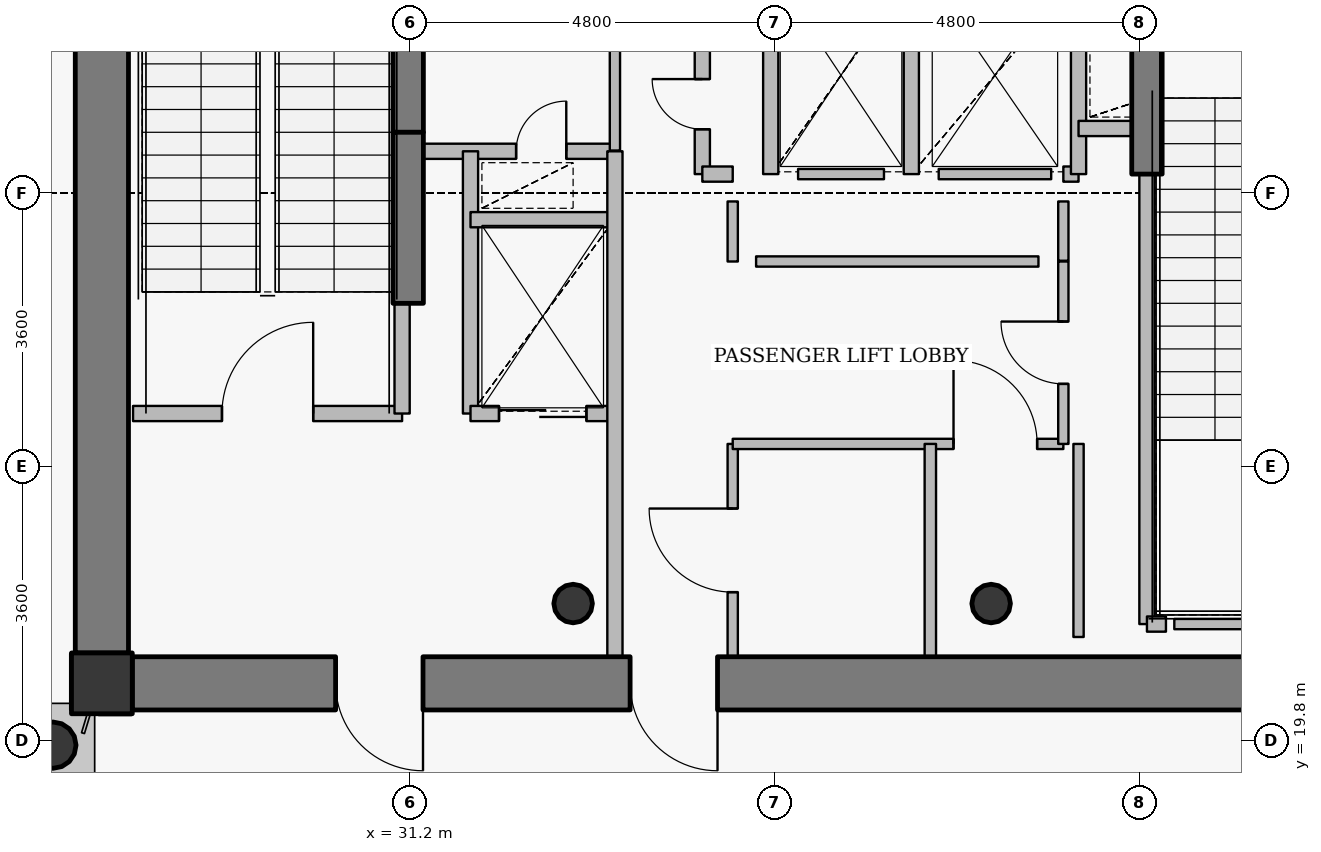
"""IFC4 building model, lengths in metres.
Left out: names, types, materials, properties, quantities, classifications, styles, units other than length and angle.
Written with IfcOpenShell. Run it as: python <this file> out.ifc"""

import sys

from ifc_helpers import new_model, si_unit, direction, frame, frame_2d, origin, origin_2d, place, context, subcontext, project, spatial, rectangle, hollow_circle, extrude, source, transform, mapped, element, fill, save


model = new_model("IFC4")
c1 = context("Model", 3, precision=1e-05, world=origin(), true_north=direction((0.0, 1.0)))
c2 = subcontext(c1, "Body", "Model", "MODEL_VIEW")
j1 = project(units=[si_unit("LENGTHUNIT", "METRE"), si_unit("PLANEANGLEUNIT", "RADIAN")], contexts=[c1])
p1 = place(None, origin())
s1 = spatial("IfcSite", under=j1, at=p1, CompositionType="ELEMENT")
p2 = place(p1, origin())
s2 = spatial("IfcBuilding", under=s1, at=p2, CompositionType="ELEMENT")
p3 = place(p2, frame((0.0, 0.0, 368.4)))
s3 = spatial("IfcBuildingStorey", under=s2, at=p3, CompositionType="ELEMENT", Elevation=368.4)
p4 = place(p3, frame((27.15, 20.55, 0.0), z_axis=(0.0, 0.0, 1.0), x_axis=(1.0, 0.0, 0.0)))
e1 = element("IfcColumn", 1, at=p4, inside=s3, PredefinedType="COLUMN", context=c2, shape_type="SweptSolid", body=[
    extrude(rectangle(XDim=0.8, YDim=0.8, at=origin_2d()), origin(), (0.0, 0.0, 1.0), 4.8),
])
for number, where, z_axis, x_axis in (
    (2, (33.35, 21.6, 0.0), (0.0, 0.0, 1.0), (1.0, 0.0, 0.0)),
    (3, (38.85, 21.6, 0.0), (0.0, 0.0, 1.0), (1.0, 0.0, 0.0)),
):
    element("IfcColumn", number, at=place(p3, frame(where, z_axis=z_axis, x_axis=x_axis)), inside=s3, PredefinedType="COLUMN", context=c2, shape_type="SweptSolid", body=[
        extrude(hollow_circle(Radius=0.254, WallThickness=0.02, at=origin_2d()), origin(), (0.0, 0.0, 1.0), 4.8),
    ])
p5 = place(p3, frame((31.18, 27.8, 0.0), z_axis=(0.0, 0.0, 1.0), x_axis=(0.0, 1.0, 0.0)))
e4 = element("IfcWall", 4, at=p5, inside=s3, PredefinedType="SHEAR", context=c2, shape_type="SweptSolid", body=[
    extrude(rectangle(XDim=4.75, YDim=0.4, at=frame_2d((2.375, 0.0))), origin(), (0.0, 0.0, 1.0), 4.8),
])
p6 = place(p3, frame((44.45, 20.55, 0.0), z_axis=(0.0, 0.0, 1.0), x_axis=(-1.0, 0.0, 0.0)))
e5 = element("IfcWall", 5, at=p6, inside=s3, PredefinedType="SHEAR", context=c2, shape_type="SweptSolid", body=[
    extrude(rectangle(XDim=16.9, YDim=0.7, at=frame_2d((8.45, 0.0))), origin(), (0.0, 0.0, 1.0), 4.05),
])
p7 = place(p6, frame((13.075, 0.0, 0.0)))
e6 = element("IfcOpeningElement", 6, at=p7, cuts=e5, PredefinedType="OPENING", context=c2, shape_type="SweptSolid", body=[
    extrude(rectangle(XDim=1.15, YDim=2.15, at=origin_2d()), frame((0.575, 0.36, 1.075), z_axis=(0.0, -1.0, 0.0), x_axis=(1.0, 0.0, 0.0)), (0.0, 0.0, 1.0), 0.72),
])
p8 = place(p6, frame((9.2, 0.0, 0.0)))
e7 = element("IfcOpeningElement", 7, at=p8, cuts=e5, PredefinedType="OPENING", context=c2, shape_type="SweptSolid", body=[
    extrude(rectangle(XDim=1.15, YDim=2.15, at=origin_2d()), frame((0.575, 0.36, 1.075), z_axis=(0.0, -1.0, 0.0), x_axis=(1.0, 0.0, 0.0)), (0.0, 0.0, 1.0), 0.72),
])
p9 = place(p3, frame((27.15, 20.95, 0.0), z_axis=(0.0, 0.0, 1.0), x_axis=(0.0, 1.0, 0.0)))
e8 = element("IfcWall", 8, at=p9, inside=s3, PredefinedType="SHEAR", context=c2, shape_type="SweptSolid", body=[
    extrude(rectangle(XDim=12.1, YDim=0.7, at=frame_2d((6.05, 0.0))), origin(), (0.0, 0.0, 1.0), 4.05),
])
p10 = place(p3, frame((31.18, 25.55, 0.0), z_axis=(0.0, 0.0, 1.0), x_axis=(0.0, 1.0, 0.0)))
e9 = element("IfcWall", 9, at=p10, inside=s3, PredefinedType="SHEAR", context=c2, shape_type="SweptSolid", body=[
    extrude(rectangle(XDim=2.25, YDim=0.4, at=frame_2d((1.125, 0.0))), origin(), (0.0, 0.0, 1.0), 4.1),
])
p11 = place(p3, frame((40.9, 27.25, 0.0), z_axis=(0.0, 0.0, 1.0), x_axis=(0.0, 1.0, 0.0)))
e10 = element("IfcWall", 10, at=p11, inside=s3, PredefinedType="SHEAR", context=c2, shape_type="SweptSolid", body=[
    extrude(rectangle(XDim=2.6, YDim=0.4, at=frame_2d((1.3, 0.0))), origin(), (0.0, 0.0, 1.0), 4.1),
])
p12 = place(p3, frame((26.505, 19.737, -0.3), z_axis=(0.0, 0.0, 1.0), x_axis=(1.0, 0.0, 0.0)))
e11 = element("IfcColumn", 11, at=p12, inside=s3, PredefinedType="COLUMN", context=c2, shape_type="SweptSolid", body=[
    extrude(hollow_circle(Radius=0.305, WallThickness=0.025, at=origin_2d()), origin(), (0.0, 0.0, 1.0), 4.8),
])
p13 = place(p3, frame((27.833, 18.209, 0.0), z_axis=(0.0, 0.0, 1.0), x_axis=(-0.830407326996, 0.557156774411, 0.0)))
e12 = element("IfcWall", 12, at=p13, inside=s3, PredefinedType="SOLIDWALL", context=c2, shape_type="SweptSolid", body=[
    extrude(rectangle(XDim=1.993, YDim=0.28, at=frame_2d((0.997, 0.0))), origin(), (0.0, 0.0, 1.0), 4.5),
])
p14 = place(p3, frame((27.56, 24.1, 0.0), z_axis=(0.0, 0.0, 1.0), x_axis=(1.0, 0.0, 0.0)))
e13 = element("IfcWall", 13, at=p14, inside=s3, PredefinedType="PARTITIONING", context=c2, shape_type="SweptSolid", body=[
    extrude(rectangle(XDim=3.54, YDim=0.2, at=frame_2d((1.77, 0.0))), origin(), (0.0, 0.0, 1.0), 4.5),
])
p15 = place(p14, frame((1.17, 0.0, 0.0)))
e14 = element("IfcOpeningElement", 14, at=p15, cuts=e13, PredefinedType="OPENING", context=c2, shape_type="SweptSolid", body=[
    extrude(rectangle(XDim=1.2, YDim=2.15, at=origin_2d()), frame((0.6, 0.11, 1.075), z_axis=(0.0, -1.0, 0.0), x_axis=(1.0, 0.0, 0.0)), (0.0, 0.0, 1.0), 0.22),
])
p16 = place(p3, frame((31.1, 24.1, 0.0), z_axis=(0.0, 0.0, 1.0), x_axis=(0.0, 1.0, 0.0)))
e15 = element("IfcWall", 15, at=p16, inside=s3, PredefinedType="PARTITIONING", context=c2, shape_type="SweptSolid", body=[
    extrude(rectangle(XDim=1.44, YDim=0.2, at=frame_2d((0.72, 0.0))), origin(), (0.0, 0.0, 1.0), 4.5),
])
p17 = place(p3, frame((31.1, 27.55, 0.0), z_axis=(0.0, 0.0, 1.0), x_axis=(1.0, 0.0, 0.0)))
e16 = element("IfcWall", 16, at=p17, inside=s3, PredefinedType="PARTITIONING", context=c2, shape_type="SweptSolid", body=[
    extrude(rectangle(XDim=2.8, YDim=0.2, at=frame_2d((1.4, 0.0))), origin(), (0.0, 0.0, 1.0), 4.085),
])
p18 = place(p17, frame((1.5, 0.0, 0.0)))
e17 = element("IfcOpeningElement", 17, at=p18, cuts=e16, PredefinedType="OPENING", context=c2, shape_type="SweptSolid", body=[
    extrude(rectangle(XDim=0.66, YDim=2.05, at=origin_2d()), frame((0.33, 0.11, 1.025), z_axis=(0.0, -1.0, 0.0), x_axis=(1.0, 0.0, 0.0)), (0.0, 0.0, 1.0), 0.22),
])
p19 = place(p3, frame((32.0, 24.1, 0.0), z_axis=(0.0, 0.0, 1.0), x_axis=(0.0, 1.0, 0.0)))
e18 = element("IfcWall", 18, at=p19, inside=s3, PredefinedType="PARTITIONING", context=c2, shape_type="SweptSolid", body=[
    extrude(rectangle(XDim=3.45, YDim=0.2, at=frame_2d((1.725, 0.0))), origin(), (0.0, 0.0, 1.0), 4.5),
])
p20 = place(p3, frame((32.0, 24.1, 0.0), z_axis=(0.0, 0.0, 1.0), x_axis=(1.0, 0.0, 0.0)))
e19 = element("IfcWall", 19, at=p20, inside=s3, PredefinedType="PARTITIONING", context=c2, shape_type="SweptSolid", body=[
    extrude(rectangle(XDim=1.9, YDim=0.2, at=frame_2d((0.95, 0.0))), origin(), (0.0, 0.0, 1.0), 4.085),
])
p21 = place(p20, frame((0.375, 0.0, 0.0)))
e20 = element("IfcOpeningElement", 20, at=p21, cuts=e19, PredefinedType="OPENING", context=c2, shape_type="SweptSolid", body=[
    extrude(rectangle(XDim=1.15, YDim=2.15, at=origin_2d()), frame((0.575, 0.11, 1.075), z_axis=(0.0, -1.0, 0.0), x_axis=(1.0, 0.0, 0.0)), (0.0, 0.0, 1.0), 0.22),
])
p22 = place(p3, frame((32.0, 26.65, 0.0), z_axis=(0.0, 0.0, 1.0), x_axis=(1.0, 0.0, 0.0)))
e21 = element("IfcWall", 21, at=p22, inside=s3, PredefinedType="PARTITIONING", context=c2, shape_type="SweptSolid", body=[
    extrude(rectangle(XDim=1.9, YDim=0.2, at=frame_2d((0.95, 0.0))), origin(), (0.0, 0.0, 1.0), 4.085),
])
p23 = place(p3, frame((33.9, 20.9, 0.0), z_axis=(0.0, 0.0, 1.0), x_axis=(0.0, 1.0, 0.0)))
e22 = element("IfcWall", 22, at=p23, inside=s3, PredefinedType="PARTITIONING", context=c2, shape_type="SweptSolid", body=[
    extrude(rectangle(XDim=6.65, YDim=0.2, at=frame_2d((3.325, 0.0))), origin(), (0.0, 0.0, 1.0), 4.085),
])
p24 = place(p3, frame((33.9, 27.56, 0.0), z_axis=(0.0, 0.0, 1.0), x_axis=(0.0, 1.0, 0.0)))
e23 = element("IfcWall", 23, at=p24, inside=s3, PredefinedType="PARTITIONING", context=c2, shape_type="SweptSolid", body=[
    extrude(rectangle(XDim=5.54, YDim=0.135, at=frame_2d((2.77, 0.0))), origin(), (0.0, 0.0, 1.0), 4.085),
])
p25 = place(p24, frame((2.22, 0.0, 0.0)))
e24 = element("IfcOpeningElement", 24, at=p25, cuts=e23, PredefinedType="OPENING", context=c2, shape_type="SweptSolid", body=[
    extrude(rectangle(XDim=1.1, YDim=2.15, at=origin_2d()), frame((0.55, 0.078, 1.075), z_axis=(0.0, -1.0, 0.0), x_axis=(1.0, 0.0, 0.0)), (0.0, 0.0, 1.0), 0.155),
])
p26 = place(p3, frame((35.05, 27.25, 0.0), z_axis=(0.0, 0.0, 1.0), x_axis=(0.0, 1.0, 0.0)))
e25 = element("IfcWall", 25, at=p26, inside=s3, PredefinedType="PARTITIONING", context=c2, shape_type="SweptSolid", body=[
    extrude(rectangle(XDim=3.6, YDim=0.2, at=frame_2d((1.8, 0.0))), origin(), (0.0, 0.0, 1.0), 4.5),
])
p27 = place(p26, frame((0.59, 0.0, 0.0)))
e26 = element("IfcOpeningElement", 26, at=p27, cuts=e25, PredefinedType="OPENING", context=c2, shape_type="SweptSolid", body=[
    extrude(rectangle(XDim=0.66, YDim=2.05, at=origin_2d()), frame((0.33, 0.11, 1.025), z_axis=(0.0, -1.0, 0.0), x_axis=(1.0, 0.0, 0.0)), (0.0, 0.0, 1.0), 0.22),
])
p28 = place(p26, frame((2.35, 0.0, 0.0)))
e27 = element("IfcOpeningElement", 27, at=p28, cuts=e25, PredefinedType="OPENING", context=c2, shape_type="SweptSolid", body=[
    extrude(rectangle(XDim=0.66, YDim=2.05, at=origin_2d()), frame((0.33, 0.11, 1.025), z_axis=(0.0, -1.0, 0.0), x_axis=(1.0, 0.0, 0.0)), (0.0, 0.0, 1.0), 0.22),
])
p29 = place(p3, frame((35.05, 27.25, 0.0), z_axis=(0.0, 0.0, 1.0), x_axis=(1.0, 0.0, 0.0)))
e28 = element("IfcWall", 28, at=p29, inside=s3, PredefinedType="PARTITIONING", context=c2, shape_type="SweptSolid", body=[
    extrude(rectangle(XDim=0.4, YDim=0.2, at=frame_2d((0.2, 0.0))), origin(), (0.0, 0.0, 1.0), 4.5),
])
p30 = place(p3, frame((35.45, 20.9, 0.0), z_axis=(0.0, 0.0, 1.0), x_axis=(0.0, 1.0, 0.0)))
e29 = element("IfcWall", 29, at=p30, inside=s3, PredefinedType="PARTITIONING", context=c2, shape_type="SweptSolid", body=[
    extrude(rectangle(XDim=2.8, YDim=0.135, at=frame_2d((1.4, 0.0))), origin(), (0.0, 0.0, 1.0), 4.085),
])
p31 = place(p30, frame((0.85, 0.0, 0.0)))
e30 = element("IfcOpeningElement", 30, at=p31, cuts=e29, PredefinedType="OPENING", context=c2, shape_type="SweptSolid", body=[
    extrude(rectangle(XDim=1.1, YDim=2.15, at=origin_2d()), frame((0.55, 0.078, 1.075), z_axis=(0.0, -1.0, 0.0), x_axis=(1.0, 0.0, 0.0)), (0.0, 0.0, 1.0), 0.155),
])
p32 = place(p3, frame((35.45, 23.7, 0.0), z_axis=(0.0, 0.0, 1.0), x_axis=(1.0, 0.0, 0.0)))
e31 = element("IfcWall", 31, at=p32, inside=s3, PredefinedType="PARTITIONING", context=c2, shape_type="SweptSolid", body=[
    extrude(rectangle(XDim=4.35, YDim=0.135, at=frame_2d((2.175, 0.0))), origin(), (0.0, 0.0, 1.0), 4.085),
])
p33 = place(p32, frame((2.905, 0.0, 0.0)))
e32 = element("IfcOpeningElement", 32, at=p33, cuts=e31, PredefinedType="OPENING", context=c2, shape_type="SweptSolid", body=[
    extrude(rectangle(XDim=1.1, YDim=2.15, at=origin_2d()), frame((0.55, 0.078, 1.075), z_axis=(0.0, -1.0, 0.0), x_axis=(1.0, 0.0, 0.0)), (0.0, 0.0, 1.0), 0.155),
])
p34 = place(p3, frame((35.95, 27.25, 0.0), z_axis=(0.0, 0.0, 1.0), x_axis=(0.0, 1.0, 0.0)))
e33 = element("IfcWall", 33, at=p34, inside=s3, PredefinedType="PARTITIONING", context=c2, shape_type="SweptSolid", body=[
    extrude(rectangle(XDim=3.8, YDim=0.2, at=frame_2d((1.9, 0.0))), origin(), (0.0, 0.0, 1.0), 4.5),
])
p35 = place(p3, frame((37.8, 27.25, 0.0), z_axis=(0.0, 0.0, 1.0), x_axis=(0.0, 1.0, 0.0)))
e34 = element("IfcWall", 34, at=p35, inside=s3, PredefinedType="PARTITIONING", context=c2, shape_type="SweptSolid", body=[
    extrude(rectangle(XDim=2.6, YDim=0.2, at=frame_2d((1.3, 0.0))), origin(), (0.0, 0.0, 1.0), 4.5),
])
p36 = place(p3, frame((38.05, 20.38, 0.0), z_axis=(0.0, 0.0, 1.0), x_axis=(0.0, 1.0, 0.0)))
e35 = element("IfcWall", 35, at=p36, inside=s3, PredefinedType="PARTITIONING", context=c2, shape_type="SweptSolid", body=[
    extrude(rectangle(XDim=3.32, YDim=0.15, at=frame_2d((1.66, 0.0))), origin(), (0.0, 0.0, 1.0), 4.035),
])
p37 = place(p3, frame((39.8, 23.7, 0.0), z_axis=(0.0, 0.0, 1.0), x_axis=(0.0, 1.0, 0.0)))
e36 = element("IfcWall", 36, at=p37, inside=s3, PredefinedType="PARTITIONING", context=c2, shape_type="SweptSolid", body=[
    extrude(rectangle(XDim=2.4, YDim=0.135, at=frame_2d((1.2, 0.0))), origin(), (0.0, 0.0, 1.0), 4.5),
])
p38 = place(p37, frame((0.79, 0.0, 0.0)))
e37 = element("IfcOpeningElement", 37, at=p38, cuts=e36, PredefinedType="OPENING", context=c2, shape_type="SweptSolid", body=[
    extrude(rectangle(XDim=0.82, YDim=2.1, at=origin_2d()), frame((0.41, 0.078, 1.05), z_axis=(0.0, -1.0, 0.0), x_axis=(1.0, 0.0, 0.0)), (0.0, 0.0, 1.0), 0.155),
])
p39 = place(p3, frame((39.8, 27.25, 0.0), z_axis=(0.0, 0.0, 1.0), x_axis=(1.0, 0.0, 0.0)))
e38 = element("IfcWall", 38, at=p39, inside=s3, PredefinedType="PARTITIONING", context=c2, shape_type="SweptSolid", body=[
    extrude(rectangle(XDim=0.2, YDim=0.2, at=frame_2d((0.1, 0.0))), origin(), (0.0, 0.0, 1.0), 4.5),
])
p40 = place(p3, frame((40.0, 27.25, 0.0), z_axis=(0.0, 0.0, 1.0), x_axis=(0.0, 1.0, 0.0)))
e39 = element("IfcWall", 39, at=p40, inside=s3, PredefinedType="PARTITIONING", context=c2, shape_type="SweptSolid", body=[
    extrude(rectangle(XDim=2.6, YDim=0.2, at=frame_2d((1.3, 0.0))), origin(), (0.0, 0.0, 1.0), 4.5),
])
p41 = place(p3, frame((40.0, 27.85, 0.0), z_axis=(0.0, 0.0, 1.0), x_axis=(1.0, 0.0, 0.0)))
e40 = element("IfcWall", 40, at=p41, inside=s3, PredefinedType="PARTITIONING", context=c2, shape_type="SweptSolid", body=[
    extrude(rectangle(XDim=0.9, YDim=0.2, at=frame_2d((0.45, 0.0))), origin(), (0.0, 0.0, 1.0), 4.5),
])
p42 = place(p3, frame((40.9, 21.33, 0.0), z_axis=(0.0, 0.0, 1.0), x_axis=(0.0, 1.0, 0.0)))
e41 = element("IfcWall", 41, at=p42, inside=s3, PredefinedType="PARTITIONING", context=c2, shape_type="SweptSolid", body=[
    extrude(rectangle(XDim=5.91, YDim=0.2, at=frame_2d((2.955, 0.0))), origin(), (0.0, 0.0, 1.0), 4.035),
])
p43 = place(p3, frame((40.9, 21.33, 0.0), z_axis=(0.0, 0.0, 1.0), x_axis=(1.0, 0.0, 0.0)))
e42 = element("IfcWall", 42, at=p43, inside=s3, PredefinedType="PARTITIONING", context=c2, shape_type="SweptSolid", body=[
    extrude(rectangle(XDim=0.25, YDim=0.2, at=frame_2d((0.125, 0.0))), origin(), (0.0, 0.0, 1.0), 4.035),
])
p44 = place(p3, frame((44.24, 21.33, 0.0), z_axis=(0.0, 0.0, 1.0), x_axis=(-1.0, 0.0, 0.0)))
e43 = element("IfcWall", 43, at=p44, inside=s3, PredefinedType="PARTITIONING", context=c2, shape_type="SweptSolid", body=[
    extrude(rectangle(XDim=2.98, YDim=0.135, at=frame_2d((1.49, 0.0))), origin(), (0.0, 0.0, 1.0), 4.035),
])
p45 = place(p3, frame((37.44, 27.25, 0.0), z_axis=(0.0, 0.0, 1.0), x_axis=(-1.0, 0.0, 0.0)))
e44 = element("IfcWall", 44, at=p45, inside=s3, PredefinedType="PARTITIONING", context=c2, shape_type="SweptSolid", body=[
    extrude(rectangle(XDim=1.13, YDim=0.135, at=frame_2d((0.565, 0.0))), origin(), (0.0, 0.0, 1.0), 4.5),
])
p46 = place(p3, frame((39.64, 27.25, 0.0), z_axis=(0.0, 0.0, 1.0), x_axis=(-1.0, 0.0, 0.0)))
e45 = element("IfcWall", 45, at=p46, inside=s3, PredefinedType="PARTITIONING", context=c2, shape_type="SweptSolid", body=[
    extrude(rectangle(XDim=1.48, YDim=0.135, at=frame_2d((0.74, 0.0))), origin(), (0.0, 0.0, 1.0), 4.085),
])
p47 = place(p3, frame((40.0, 23.7, 0.0), z_axis=(0.0, 0.0, 1.0), x_axis=(0.0, -1.0, 0.0)))
e46 = element("IfcWall", 46, at=p47, inside=s3, PredefinedType="PARTITIONING", context=c2, shape_type="SweptSolid", body=[
    extrude(rectangle(XDim=2.54, YDim=0.135, at=frame_2d((1.27, 0.0))), origin(), (0.0, 0.0, 1.0), 4.035),
])
p48 = place(p3, frame((39.8, 26.11, 0.0), z_axis=(0.0, 0.0, 1.0), x_axis=(0.0, 1.0, 0.0)))
e47 = element("IfcWall", 47, at=p48, inside=s3, PredefinedType="PARTITIONING", context=c2, shape_type="SweptSolid", body=[
    extrude(rectangle(XDim=0.78, YDim=0.135, at=frame_2d((0.39, 0.0))), origin(), (0.0, 0.0, 1.0), 4.5),
])
p49 = place(p3, frame((35.45, 26.89, 0.0), z_axis=(0.0, 0.0, 1.0), x_axis=(0.0, -1.0, 0.0)))
e48 = element("IfcWall", 48, at=p49, inside=s3, PredefinedType="PARTITIONING", context=c2, shape_type="SweptSolid", body=[
    extrude(rectangle(XDim=0.79, YDim=0.135, at=frame_2d((0.395, 0.0))), origin(), (0.0, 0.0, 1.0), 4.5),
])
p50 = place(p3, frame((35.758, 26.1, 0.0), z_axis=(0.0, 0.0, 1.0), x_axis=(1.0, 0.0, 0.0)))
e49 = element("IfcWall", 49, at=p50, inside=s3, PredefinedType="PARTITIONING", context=c2, shape_type="SweptSolid", body=[
    extrude(rectangle(XDim=3.715, YDim=0.135, at=frame_2d((1.857, 0.0))), origin(), (0.0, 0.0, 1.0), 4.085),
])
p51 = place(p3, frame((26.8, 20.94, 0.0), z_axis=(0.0, 0.0, 1.0), x_axis=(0.0, -1.0, 0.0)))
e50 = element("IfcWall", 50, at=p51, inside=s3, PredefinedType="PARTITIONING", context=c2, shape_type="SweptSolid", body=[
    extrude(rectangle(XDim=0.74, YDim=0.135, at=frame_2d((0.37, 0.0))), origin(), (0.0, 0.0, 1.0), 4.035),
])
p52 = place(p3, frame((27.107, 20.2, 0.0), z_axis=(0.0, 0.0, 1.0), x_axis=(1.0, 0.0, 0.0)))
e51 = element("IfcWall", 51, at=p52, inside=s3, PredefinedType="PARTITIONING", context=c2, shape_type="SweptSolid", body=[
    extrude(rectangle(XDim=0.433, YDim=0.135, at=frame_2d((0.216, 0.0))), origin(), (0.0, 0.0, 1.0), 3.985),
])
m1 = source(origin(), c2, "Body", "SweptSolid", [
    extrude(rectangle(XDim=1.15, YDim=2.15, at=origin_2d()), frame((0.575, 0.025, 1.075), z_axis=(0.0, -1.0, 0.0), x_axis=(1.0, 0.0, 0.0)), (0.0, 0.0, 1.0), 0.05),
])
p53 = place(p7, origin())
e52 = element("IfcDoor", 52, at=p53, inside=s3, OperationType="SINGLE_SWING_LEFT", PredefinedType="DOOR", context=c2, shape_type="MappedRepresentation", body=[
    mapped(m1, transform((0.0, 0.0, 0.0), x_axis=(1.0, 0.0, 0.0), y_axis=(0.0, 1.0, 0.0), z_axis=(0.0, 0.0, 1.0), scale=1.0)),
])
fill(e6, e52)
p54 = place(p8, origin())
e53 = element("IfcDoor", 53, at=p54, inside=s3, OperationType="SINGLE_SWING_LEFT", PredefinedType="DOOR", context=c2, shape_type="MappedRepresentation", body=[
    mapped(m1, transform((0.0, 0.0, 0.0), x_axis=(1.0, 0.0, 0.0), y_axis=(0.0, 1.0, 0.0), z_axis=(0.0, 0.0, 1.0), scale=1.0)),
])
fill(e7, e53)
m2 = source(origin(), c2, "Body", "SweptSolid", [
    extrude(rectangle(XDim=1.2, YDim=2.15, at=origin_2d()), frame((0.6, 0.025, 1.075), z_axis=(0.0, -1.0, 0.0), x_axis=(1.0, 0.0, 0.0)), (0.0, 0.0, 1.0), 0.05),
])
p55 = place(p15, origin())
e54 = element("IfcDoor", 54, at=p55, inside=s3, OperationType="SINGLE_SWING_RIGHT", PredefinedType="DOOR", context=c2, shape_type="MappedRepresentation", body=[
    mapped(m2, transform((0.0, 0.0, 0.0), x_axis=(1.0, 0.0, 0.0), y_axis=(0.0, 1.0, 0.0), z_axis=(0.0, 0.0, 1.0), scale=1.0)),
])
fill(e14, e54)
m3 = source(origin(), c2, "Body", "SweptSolid", [
    extrude(rectangle(XDim=1.15, YDim=2.15, at=origin_2d()), frame((0.575, 0.025, 1.075), z_axis=(0.0, -1.0, 0.0), x_axis=(1.0, 0.0, 0.0)), (0.0, 0.0, 1.0), 0.05),
])
p56 = place(p21, origin())
e55 = element("IfcDoor", 55, at=p56, inside=s3, OperationType="DOUBLE_DOOR_SLIDING", PredefinedType="USERDEFINED", context=c2, shape_type="MappedRepresentation", body=[
    mapped(m3, transform((0.0, 0.0, 0.0), x_axis=(1.0, 0.0, 0.0), y_axis=(0.0, 1.0, 0.0), z_axis=(0.0, 0.0, 1.0), scale=1.0)),
])
fill(e20, e55)
m4 = source(origin(), c2, "Body", "SweptSolid", [
    extrude(rectangle(XDim=0.66, YDim=2.05, at=origin_2d()), frame((0.33, 0.025, 1.025), z_axis=(0.0, -1.0, 0.0), x_axis=(1.0, 0.0, 0.0)), (0.0, 0.0, 1.0), 0.05),
])
p57 = place(p27, origin())
e56 = element("IfcDoor", 56, at=p57, inside=s3, OperationType="SINGLE_SWING_RIGHT", PredefinedType="USERDEFINED", context=c2, shape_type="MappedRepresentation", body=[
    mapped(m4, transform((0.0, 0.0, 0.0), x_axis=(1.0, 0.0, 0.0), y_axis=(0.0, 1.0, 0.0), z_axis=(0.0, 0.0, 1.0), scale=1.0)),
])
fill(e26, e56)
m5 = source(origin(), c2, "Body", "SweptSolid", [
    extrude(rectangle(XDim=1.1, YDim=2.15, at=origin_2d()), frame((0.55, 0.025, 1.075), z_axis=(0.0, -1.0, 0.0), x_axis=(1.0, 0.0, 0.0)), (0.0, 0.0, 1.0), 0.05),
])
p58 = place(p31, origin())
e57 = element("IfcDoor", 57, at=p58, inside=s3, OperationType="SINGLE_SWING_RIGHT", PredefinedType="DOOR", context=c2, shape_type="MappedRepresentation", body=[
    mapped(m5, transform((0.0, 0.0, 0.0), x_axis=(1.0, 0.0, 0.0), y_axis=(0.0, 1.0, 0.0), z_axis=(0.0, 0.0, 1.0), scale=1.0)),
])
fill(e30, e57)
p59 = place(p33, origin())
e58 = element("IfcDoor", 58, at=p59, inside=s3, OperationType="SINGLE_SWING_LEFT", PredefinedType="DOOR", context=c2, shape_type="MappedRepresentation", body=[
    mapped(m5, transform((0.0, 0.0, 0.0), x_axis=(1.0, 0.0, 0.0), y_axis=(0.0, 1.0, 0.0), z_axis=(0.0, 0.0, 1.0), scale=1.0)),
])
fill(e32, e58)
m6 = source(origin(), c2, "Body", "SweptSolid", [
    extrude(rectangle(XDim=0.82, YDim=2.1, at=origin_2d()), frame((0.41, 0.025, 1.05), z_axis=(0.0, -1.0, 0.0), x_axis=(1.0, 0.0, 0.0)), (0.0, 0.0, 1.0), 0.05),
])
p60 = place(p38, origin())
e59 = element("IfcDoor", 59, at=p60, inside=s3, OperationType="SINGLE_SWING_RIGHT", PredefinedType="DOOR", context=c2, shape_type="MappedRepresentation", body=[
    mapped(m6, transform((0.0, 0.0, 0.0), x_axis=(1.0, 0.0, 0.0), y_axis=(0.0, 1.0, 0.0), z_axis=(0.0, 0.0, 1.0), scale=1.0)),
])
fill(e37, e59)
p61 = place(p18, origin())
e60 = element("IfcDoor", 60, at=p61, inside=s3, OperationType="SINGLE_SWING_RIGHT", PredefinedType="USERDEFINED", context=c2, shape_type="MappedRepresentation", body=[
    mapped(m4, transform((0.0, 0.0, 0.0), x_axis=(1.0, 0.0, 0.0), y_axis=(0.0, 1.0, 0.0), z_axis=(0.0, 0.0, 1.0), scale=1.0)),
])
fill(e17, e60)
save(model, sys.argv[1])
